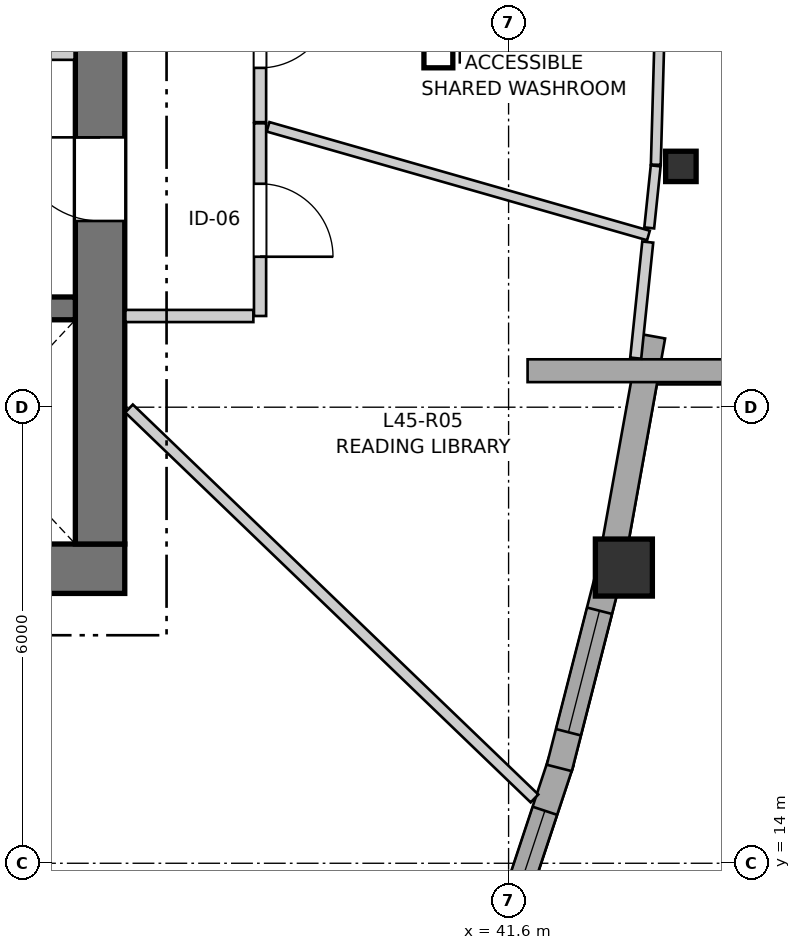
"""IFC4 building model, lengths in metres.
Left out: names, types, materials, properties, quantities, classifications, styles, units other than length and angle.
Written with IfcOpenShell. Run it as: python <this file> out.ifc"""

import sys

from ifc_helpers import new_model, si_unit, direction, frame, frame_2d, origin, origin_2d, place, context, subcontext, project, spatial, rectangle, i_section, extrude, source, transform, mapped, element, fill, save


model = new_model("IFC4")
c1 = context("Model", 3, precision=1e-05, world=origin(), true_north=direction((0.0, 1.0)))
c2 = subcontext(c1, "Body", "Model", "MODEL_VIEW")
j1 = project(units=[si_unit("LENGTHUNIT", "METRE"), si_unit("PLANEANGLEUNIT", "RADIAN")], contexts=[c1])
p1 = place(None, origin())
s1 = spatial("IfcSite", under=j1, at=p1, CompositionType="ELEMENT")
p2 = place(p1, origin())
s2 = spatial("IfcBuilding", under=s1, at=p2, CompositionType="ELEMENT")
p3 = place(p2, frame((0.0, 0.0, 152.2)))
s3 = spatial("IfcBuildingStorey", under=s2, at=p3, CompositionType="ELEMENT", Elevation=152.2)
p4 = place(p3, frame((24.15, 17.875, 0.0), z_axis=(0.0, 0.0, 1.0), x_axis=(1.0, 0.0, 0.0)))
e1 = element("IfcWall", 1, at=p4, inside=s3, PredefinedType="SHEAR", context=c2, shape_type="SweptSolid", body=[
    extrude(rectangle(XDim=12.4, YDim=0.65, at=frame_2d((6.2, 0.0))), origin(), (0.0, 0.0, 1.0), 2.935),
])
p5 = place(p3, frame((36.225, 18.2, 0.0), z_axis=(0.0, 0.0, 1.0), x_axis=(0.0, 1.0, 0.0)))
e2 = element("IfcWall", 2, at=p5, inside=s3, PredefinedType="SHEAR", context=c2, shape_type="SweptSolid", body=[
    extrude(rectangle(XDim=15.6, YDim=0.65, at=frame_2d((7.8, 0.0))), origin(), (0.0, 0.0, 1.0), 2.935),
])
p6 = place(p5, frame((4.25, 0.0, 0.0)))
e3 = element("IfcOpeningElement", 3, at=p6, cuts=e2, PredefinedType="OPENING", context=c2, shape_type="SweptSolid", body=[
    extrude(rectangle(XDim=1.1, YDim=2.15, at=frame_2d((0.55, 1.075))), frame((0.0, 0.335, 0.0), z_axis=(0.0, -1.0, 0.0), x_axis=(1.0, 0.0, 0.0)), (0.0, 0.0, 1.0), 0.67),
])
p7 = place(p5, frame((10.25, 0.0, 0.0)))
e4 = element("IfcOpeningElement", 4, at=p7, cuts=e2, PredefinedType="OPENING", context=c2, shape_type="SweptSolid", body=[
    extrude(rectangle(XDim=1.1, YDim=2.15, at=frame_2d((0.55, 1.075))), frame((0.0, 0.335, 0.0), z_axis=(0.0, -1.0, 0.0), x_axis=(1.0, 0.0, 0.0)), (0.0, 0.0, 1.0), 0.67),
])
p8 = place(p3, frame((24.8, 21.3, 0.0), z_axis=(0.0, 0.0, 1.0), x_axis=(1.0, 0.0, 0.0)))
e5 = element("IfcWall", 5, at=p8, inside=s3, PredefinedType="SHEAR", context=c2, shape_type="SweptSolid", body=[
    extrude(rectangle(XDim=11.1, YDim=0.3, at=frame_2d((5.55, 0.0))), origin(), (0.0, 0.0, 1.0), 2.935),
])
p9 = place(p8, frame((6.22, 0.0, 0.0)))
e6 = element("IfcOpeningElement", 6, at=p9, cuts=e5, PredefinedType="OPENING", context=c2, shape_type="SweptSolid", body=[
    extrude(rectangle(XDim=0.98, YDim=2.15, at=frame_2d((0.49, 1.075))), frame((0.0, 0.16, 0.0), z_axis=(0.0, -1.0, 0.0), x_axis=(1.0, 0.0, 0.0)), (0.0, 0.0, 1.0), 0.32),
])
p10 = place(p8, frame((9.15, 0.0, 0.0)))
e7 = element("IfcOpeningElement", 7, at=p10, cuts=e5, PredefinedType="OPENING", context=c2, shape_type="SweptSolid", body=[
    extrude(rectangle(XDim=1.15, YDim=2.15, at=frame_2d((0.575, 1.075))), frame((0.0, 0.16, 0.0), z_axis=(0.0, -1.0, 0.0), x_axis=(1.0, 0.0, 0.0)), (0.0, 0.0, 1.0), 0.32),
])
m1 = source(origin(), c2, "Body", "SweptSolid", [
    extrude(rectangle(XDim=0.75, YDim=0.75, at=origin_2d()), origin(), (0.0, 0.0, 1.0), 2.935),
])
p11 = place(p3, frame((43.117, 17.89, 0.0), z_axis=(0.0, 0.0, 1.0), x_axis=(1.0, 0.0, 0.0)))
e8 = element("IfcColumn", 8, at=p11, inside=s3, PredefinedType="COLUMN", context=c2, shape_type="MappedRepresentation", body=[
    mapped(m1, transform((0.0, 0.0, 0.0), x_axis=(1.0, 0.0, 0.0), y_axis=(0.0, 1.0, 0.0), z_axis=(0.0, 0.0, 1.0), scale=1.0)),
])
m2 = source(origin(), c2, "Body", "SweptSolid", [
    extrude(i_section(OverallWidth=0.401, OverallDepth=0.399, WebThickness=0.023, FlangeThickness=0.036, FilletRadius=0.015, at=origin_2d()), origin(), (0.0, 0.0, 1.0), 2.935),
])
p12 = place(p3, frame((43.867, 23.168, 0.0), z_axis=(0.0, 0.0, 1.0), x_axis=(1.0, 0.0, 0.0)))
e9 = element("IfcColumn", 9, at=p12, inside=s3, PredefinedType="PILASTER", context=c2, shape_type="MappedRepresentation", body=[
    mapped(m2, transform((0.0, 0.0, 0.0), x_axis=(1.0, 0.0, 0.0), y_axis=(0.0, 1.0, 0.0), z_axis=(0.0, 0.0, 1.0), scale=1.0)),
])
p13 = place(p3, frame((41.411, 12.677, 0.0), z_axis=(0.0, 0.0, 1.0), x_axis=(0.31445026244, 0.949273950159, 0.0)))
e10 = element("IfcWall", 10, at=p13, inside=s3, PredefinedType="SOLIDWALL", context=c2, shape_type="SweptSolid", body=[
    extrude(rectangle(XDim=2.803, YDim=0.34, at=frame_2d((1.401, 0.0))), origin(), (0.0, 0.0, 1.0), 2.515),
])
p14 = place(p13, frame((0.321, 0.0, 0.82)))
e11 = element("IfcOpeningElement", 11, at=p14, cuts=e10, PredefinedType="OPENING", context=c2, shape_type="SweptSolid", body=[
    extrude(rectangle(XDim=1.8, YDim=1.45, at=frame_2d((0.9, 0.725))), frame((0.0, 0.18, 0.0), z_axis=(0.0, -1.0, 0.0), x_axis=(1.0, 0.0, 0.0)), (0.0, 0.0, 1.0), 0.36),
])
p15 = place(p3, frame((42.267, 15.254, 0.0), z_axis=(0.0, 0.0, 1.0), x_axis=(0.247727064013, 0.96882986213, 0.0)))
e12 = element("IfcWall", 12, at=p15, inside=s3, PredefinedType="SOLIDWALL", context=c2, shape_type="SweptSolid", body=[
    extrude(rectangle(XDim=2.61, YDim=0.34, at=frame_2d((1.305, 0.0))), origin(), (0.0, 0.0, 1.0), 2.515),
])
p16 = place(p15, frame((0.485, 0.0, 0.82)))
e13 = element("IfcOpeningElement", 13, at=p16, cuts=e12, PredefinedType="OPENING", context=c2, shape_type="SweptSolid", body=[
    extrude(rectangle(XDim=1.65, YDim=1.45, at=frame_2d((0.825, 0.725))), frame((0.0, 0.18, 0.0), z_axis=(0.0, -1.0, 0.0), x_axis=(1.0, 0.0, 0.0)), (0.0, 0.0, 1.0), 0.36),
])
p17 = place(p3, frame((42.977, 18.073, 0.0), z_axis=(0.0, 0.0, 1.0), x_axis=(0.177185533742, 0.984177467042, 0.0)))
e14 = element("IfcWall", 14, at=p17, inside=s3, PredefinedType="SOLIDWALL", context=c2, shape_type="SweptSolid", body=[
    extrude(rectangle(XDim=2.907, YDim=0.34, at=frame_2d((1.454, 0.0))), origin(), (0.0, 0.0, 1.0), 2.515),
])
p18 = place(p3, frame((41.85, 20.48, 0.0), z_axis=(0.0, 0.0, 1.0), x_axis=(1.0, 0.0, 0.0)))
e15 = element("IfcWall", 15, at=p18, inside=s3, PredefinedType="SOLIDWALL", context=c2, shape_type="SweptSolid", body=[
    extrude(rectangle(XDim=17.423, YDim=0.3, at=frame_2d((8.711, 0.0))), origin(), (0.0, 0.0, 1.0), 2.115),
])
p19 = place(p3, frame((30.67, 24.66, 0.0), z_axis=(0.0, 0.0, 1.0), x_axis=(1.0, 0.0, 0.0)))
e16 = element("IfcWall", 16, at=p19, inside=s3, PredefinedType="PARTITIONING", context=c2, shape_type="SweptSolid", body=[
    extrude(rectangle(XDim=5.22, YDim=0.18, at=frame_2d((2.61, 0.0))), origin(), (0.0, 0.0, 1.0), 2.935),
])
p20 = place(p19, frame((0.68, 0.0, 0.0)))
e17 = element("IfcOpeningElement", 17, at=p20, cuts=e16, PredefinedType="OPENING", context=c2, shape_type="SweptSolid", body=[
    extrude(rectangle(XDim=0.98, YDim=2.15, at=frame_2d((0.49, 1.075))), frame((0.0, 0.1, 0.0), z_axis=(0.0, -1.0, 0.0), x_axis=(1.0, 0.0, 0.0)), (0.0, 0.0, 1.0), 0.2),
])
p21 = place(p3, frame((38.33, 23.735, 0.0), z_axis=(0.0, 0.0, 1.0), x_axis=(0.0, -1.0, 0.0)))
e18 = element("IfcWall", 18, at=p21, inside=s3, PredefinedType="PARTITIONING", context=c2, shape_type="SweptSolid", body=[
    extrude(rectangle(XDim=2.535, YDim=0.16, at=frame_2d((1.268, 0.0))), origin(), (0.0, 0.0, 1.0), 2.935),
])
p22 = place(p21, frame((0.795, 0.0, 0.0)))
e19 = element("IfcOpeningElement", 19, at=p22, cuts=e18, PredefinedType="OPENING", context=c2, shape_type="SweptSolid", body=[
    extrude(rectangle(XDim=0.96, YDim=2.1, at=frame_2d((0.48, 1.05))), frame((0.0, 0.09, 0.0), z_axis=(0.0, -1.0, 0.0), x_axis=(1.0, 0.0, 0.0)), (0.0, 0.0, 1.0), 0.18),
])
p23 = place(p3, frame((38.33, 26.129, 0.0), z_axis=(0.0, 0.0, 1.0), x_axis=(0.0, -1.0, 0.0)))
e20 = element("IfcWall", 20, at=p23, inside=s3, PredefinedType="PARTITIONING", context=c2, shape_type="SweptSolid", body=[
    extrude(rectangle(XDim=2.379, YDim=0.16, at=frame_2d((1.189, 0.0))), origin(), (0.0, 0.0, 1.0), 2.935),
])
p24 = place(p23, frame((0.715, 0.0, 0.0)))
e21 = element("IfcOpeningElement", 21, at=p24, cuts=e20, PredefinedType="OPENING", context=c2, shape_type="SweptSolid", body=[
    extrude(rectangle(XDim=0.95, YDim=2.1, at=frame_2d((0.475, 1.05))), frame((0.0, 0.09, 0.0), z_axis=(0.0, -1.0, 0.0), x_axis=(1.0, 0.0, 0.0)), (0.0, 0.0, 1.0), 0.18),
])
p25 = place(p3, frame((36.606, 19.983, 0.0), z_axis=(0.0, 0.0, 1.0), x_axis=(0.720776649136, -0.69316738387, 0.0)))
e22 = element("IfcWall", 22, at=p25, inside=s3, PredefinedType="PARTITIONING", context=c2, shape_type="SweptSolid", body=[
    extrude(rectangle(XDim=7.401, YDim=0.145, at=frame_2d((3.701, 0.0))), origin(), (0.0, 0.0, 1.0), 2.935),
])
p26 = place(p3, frame((38.436, 23.689, 0.0), z_axis=(0.0, 0.0, 1.0), x_axis=(0.961531027854, -0.274696345942, 0.0)))
e23 = element("IfcWall", 23, at=p26, inside=s3, PredefinedType="PARTITIONING", context=c2, shape_type="SweptSolid", body=[
    extrude(rectangle(XDim=5.205, YDim=0.13, at=frame_2d((2.602, 0.0))), origin(), (0.0, 0.0, 1.0), 2.935),
])
p27 = place(p3, frame((43.537, 23.19, 0.0), z_axis=(0.0, 0.0, 1.0), x_axis=(0.028319632762, 0.999598918767, 0.0)))
e24 = element("IfcWall", 24, at=p27, inside=s3, PredefinedType="PARTITIONING", context=c2, shape_type="SweptSolid", body=[
    extrude(rectangle(XDim=2.612, YDim=0.13, at=frame_2d((1.306, 0.0))), origin(), (0.0, 0.0, 1.0), 2.503),
])
p28 = place(p3, frame((36.558, 21.2, 0.0), z_axis=(0.0, 0.0, 1.0), x_axis=(1.0, 0.0, 0.0)))
e25 = element("IfcWall", 25, at=p28, inside=s3, PredefinedType="PARTITIONING", context=c2, shape_type="SweptSolid", body=[
    extrude(rectangle(XDim=1.684, YDim=0.16, at=frame_2d((0.842, 0.0))), origin(), (0.0, 0.0, 1.0), 2.935),
])
p29 = place(p3, frame((43.273, 20.646, 0.0), z_axis=(0.0, 0.0, 1.0), x_axis=(0.103045636414, 0.99467662927, 0.0)))
e26 = element("IfcWall", 26, at=p29, inside=s3, PredefinedType="PARTITIONING", context=c2, shape_type="SweptSolid", body=[
    extrude(rectangle(XDim=1.535, YDim=0.145, at=frame_2d((0.768, 0.0))), origin(), (0.0, 0.0, 1.0), 2.503),
])
p30 = place(p3, frame((43.45, 22.359, 0.0), z_axis=(0.0, 0.0, 1.0), x_axis=(0.103538633142, 0.994625432737, 0.0)))
e27 = element("IfcWall", 27, at=p30, inside=s3, PredefinedType="PARTITIONING", context=c2, shape_type="SweptSolid", body=[
    extrude(rectangle(XDim=0.821, YDim=0.13, at=frame_2d((0.41, 0.0))), origin(), (0.0, 0.0, 1.0), 2.503),
])
m3 = source(origin(), c2, "Body", "SweptSolid", [
    extrude(rectangle(XDim=1.8, YDim=1.45, at=frame_2d((0.9, 0.725))), frame((0.0, 0.03, 0.0), z_axis=(0.0, -1.0, 0.0), x_axis=(1.0, 0.0, 0.0)), (0.0, 0.0, 1.0), 0.06),
])
p31 = place(p14, origin())
e28 = element("IfcWindow", 28, at=p31, inside=s3, PartitioningType="SINGLE_PANEL", PredefinedType="WINDOW", context=c2, shape_type="MappedRepresentation", body=[
    mapped(m3, transform((0.0, 0.0, 0.0), x_axis=(1.0, 0.0, 0.0), y_axis=(0.0, 1.0, 0.0), z_axis=(0.0, 0.0, 1.0), scale=1.0)),
])
fill(e11, e28)
m4 = source(origin(), c2, "Body", "SweptSolid", [
    extrude(rectangle(XDim=1.65, YDim=1.45, at=frame_2d((0.825, 0.725))), frame((0.0, 0.03, 0.0), z_axis=(0.0, -1.0, 0.0), x_axis=(1.0, 0.0, 0.0)), (0.0, 0.0, 1.0), 0.06),
])
p32 = place(p16, origin())
e29 = element("IfcWindow", 29, at=p32, inside=s3, PartitioningType="SINGLE_PANEL", PredefinedType="WINDOW", context=c2, shape_type="MappedRepresentation", body=[
    mapped(m4, transform((0.0, 0.0, 0.0), x_axis=(1.0, 0.0, 0.0), y_axis=(0.0, 1.0, 0.0), z_axis=(0.0, 0.0, 1.0), scale=1.0)),
])
fill(e13, e29)
m5 = source(origin(), c2, "Body", "SweptSolid", [
    extrude(rectangle(XDim=1.1, YDim=2.15, at=frame_2d((0.55, 1.075))), frame((0.0, 0.025, 0.0), z_axis=(0.0, -1.0, 0.0), x_axis=(1.0, 0.0, 0.0)), (0.0, 0.0, 1.0), 0.05),
])
p33 = place(p6, origin())
e30 = element("IfcDoor", 30, at=p33, inside=s3, OperationType="SINGLE_SWING_RIGHT", PredefinedType="DOOR", context=c2, shape_type="MappedRepresentation", body=[
    mapped(m5, transform((0.0, 0.0, 0.0), x_axis=(1.0, 0.0, 0.0), y_axis=(0.0, 1.0, 0.0), z_axis=(0.0, 0.0, 1.0), scale=1.0)),
])
fill(e3, e30)
m6 = source(origin(), c2, "Body", "SweptSolid", [
    extrude(rectangle(XDim=0.96, YDim=2.1, at=frame_2d((0.48, 1.05))), frame((0.0, 0.025, 0.0), z_axis=(0.0, -1.0, 0.0), x_axis=(1.0, 0.0, 0.0)), (0.0, 0.0, 1.0), 0.05),
])
p34 = place(p22, origin())
e31 = element("IfcDoor", 31, at=p34, inside=s3, OperationType="SINGLE_SWING_RIGHT", PredefinedType="DOOR", context=c2, shape_type="MappedRepresentation", body=[
    mapped(m6, transform((0.0, 0.0, 0.0), x_axis=(1.0, 0.0, 0.0), y_axis=(0.0, 1.0, 0.0), z_axis=(0.0, 0.0, 1.0), scale=1.0)),
])
fill(e19, e31)
m7 = source(origin(), c2, "Body", "SweptSolid", [
    extrude(rectangle(XDim=0.95, YDim=2.1, at=frame_2d((0.475, 1.05))), frame((0.0, 0.025, 0.0), z_axis=(0.0, -1.0, 0.0), x_axis=(1.0, 0.0, 0.0)), (0.0, 0.0, 1.0), 0.05),
])
p35 = place(p24, origin())
e32 = element("IfcDoor", 32, at=p35, inside=s3, OperationType="SINGLE_SWING_LEFT", PredefinedType="DOOR", context=c2, shape_type="MappedRepresentation", body=[
    mapped(m7, transform((0.0, 0.0, 0.0), x_axis=(1.0, 0.0, 0.0), y_axis=(0.0, 1.0, 0.0), z_axis=(0.0, 0.0, 1.0), scale=1.0)),
])
fill(e21, e32)
save(model, sys.argv[1])
